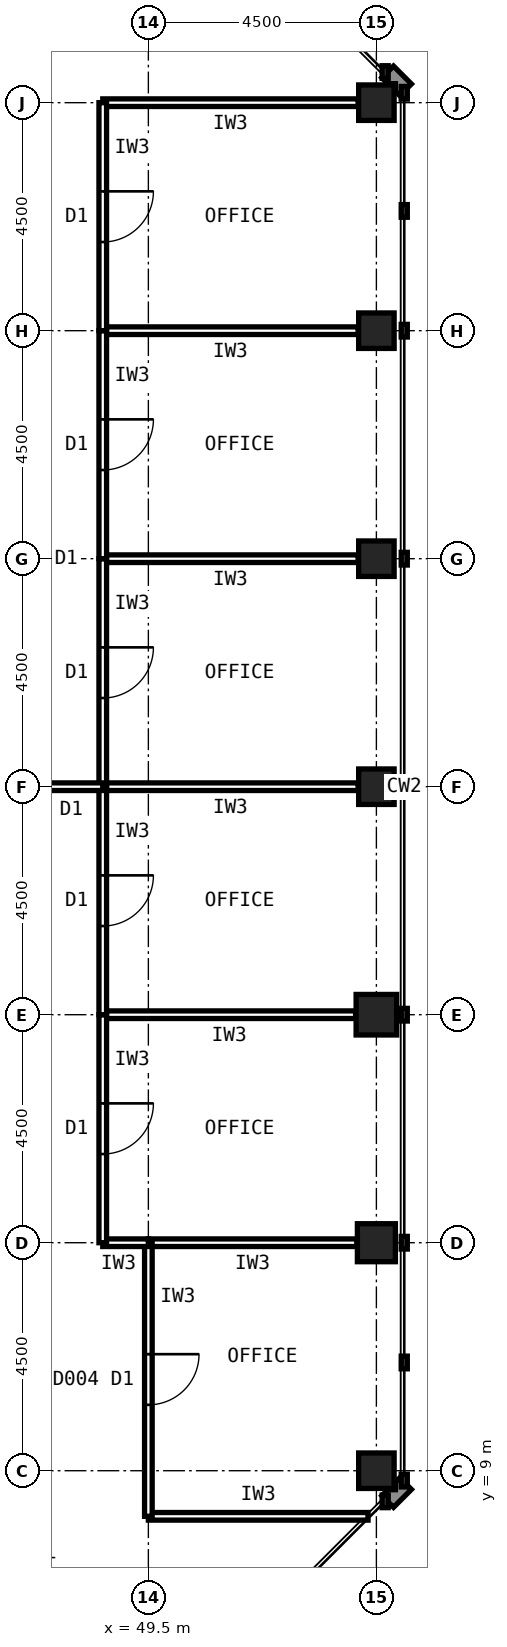
"""IFC4 building model, lengths in metres.
Left out: names, types, materials, properties, quantities, classifications, styles, units other than length and angle.
Written with IfcOpenShell. Run it as: python <this file> out.ifc"""

import sys

from ifc_helpers import new_model, si_unit, direction, frame, frame_2d, origin, origin_2d, place, context, subcontext, project, spatial, rectangle, hollow_rectangle, extrude, element, fill, save


model = new_model("IFC4")
c1 = context("Model", 3, precision=1e-05, world=origin(), true_north=direction((0.0, 1.0)))
c2 = subcontext(c1, "Body", "Model", "MODEL_VIEW")
j1 = project(units=[si_unit("LENGTHUNIT", "METRE"), si_unit("PLANEANGLEUNIT", "RADIAN")], contexts=[c1])
p1 = place(None, origin())
s1 = spatial("IfcSite", under=j1, at=p1, CompositionType="ELEMENT")
p2 = place(p1, origin())
s2 = spatial("IfcBuilding", under=s1, at=p2, CompositionType="ELEMENT")
p3 = place(p2, frame((0.0, 0.0, 175.6)))
s3 = spatial("IfcBuildingStorey", under=s2, at=p3, CompositionType="ELEMENT", Elevation=175.6)
p4 = place(p3, frame((54.0, 9.0, 0.0), z_axis=(0.0, 0.0, 1.0), x_axis=(1.0, 0.0, 0.0)))
e1 = element("IfcColumn", 1, at=p4, inside=s3, PredefinedType="COLUMN", context=c2, shape_type="SweptSolid", body=[
    extrude(hollow_rectangle(XDim=0.7, YDim=0.7, WallThickness=0.036, at=origin_2d()), origin(), (0.0, 0.0, 1.0), 4.0),
])
p5 = place(p3, frame((54.0, 13.5, 0.0), z_axis=(0.0, 0.0, 1.0), x_axis=(1.0, 0.0, 0.0)))
e2 = element("IfcColumn", 2, at=p5, inside=s3, PredefinedType="COLUMN", context=c2, shape_type="SweptSolid", body=[
    extrude(hollow_rectangle(XDim=0.75, YDim=0.75, WallThickness=0.04, at=origin_2d()), origin(), (0.0, 0.0, 1.0), 4.0),
])
p6 = place(p3, frame((54.0, 18.0, 0.0), z_axis=(0.0, 0.0, 1.0), x_axis=(1.0, 0.0, 0.0)))
e3 = element("IfcColumn", 3, at=p6, inside=s3, PredefinedType="COLUMN", context=c2, shape_type="SweptSolid", body=[
    extrude(hollow_rectangle(XDim=0.8, YDim=0.8, WallThickness=0.045, at=origin_2d()), origin(), (0.0, 0.0, 1.0), 4.0),
])
for number, where, z_axis, x_axis in (
    (4, (54.0, 22.5, 0.0), (0.0, 0.0, 1.0), (1.0, 0.0, 0.0)),
    (5, (54.0, 27.0, 0.0), (0.0, 0.0, 1.0), (1.0, 0.0, 0.0)),
    (6, (54.0, 31.5, 0.0), (0.0, 0.0, 1.0), (1.0, 0.0, 0.0)),
    (7, (54.0, 36.0, 0.0), (0.0, 0.0, 1.0), (1.0, 0.0, 0.0)),
):
    element("IfcColumn", number, at=place(p3, frame(where, z_axis=z_axis, x_axis=x_axis)), inside=s3, PredefinedType="COLUMN", context=c2, shape_type="SweptSolid", body=[
        extrude(hollow_rectangle(XDim=0.7, YDim=0.7, WallThickness=0.036, at=origin_2d()), origin(), (0.0, 0.0, 1.0), 4.0),
    ])
p7 = place(p3, frame((49.5, 8.1, 0.0), z_axis=(0.0, 0.0, 1.0), x_axis=(1.0, 0.0, 0.0)))
e8 = element("IfcWall", 8, at=p7, inside=s3, PredefinedType="PARTITIONING", context=c2, shape_type="SweptSolid", body=[
    extrude(rectangle(XDim=4.335, YDim=0.15, at=frame_2d((2.168, 0.0))), origin(), (0.0, 0.0, 1.0), 3.84),
])
p8 = place(p3, frame((53.615, 13.5, 0.0), z_axis=(0.0, 0.0, 1.0), x_axis=(-1.0, 0.0, 0.0)))
e9 = element("IfcWall", 9, at=p8, inside=s3, PredefinedType="PARTITIONING", context=c2, shape_type="SweptSolid", body=[
    extrude(rectangle(XDim=4.115, YDim=0.15, at=frame_2d((2.058, 0.0))), origin(), (0.0, 0.0, 1.0), 2.989),
])
p9 = place(p3, frame((49.5, 13.5, 0.0), z_axis=(0.0, 0.0, 1.0), x_axis=(0.0, -1.0, 0.0)))
e10 = element("IfcWall", 10, at=p9, inside=s3, PredefinedType="PARTITIONING", context=c2, shape_type="SweptSolid", body=[
    extrude(rectangle(XDim=5.4, YDim=0.15, at=frame_2d((2.7, 0.0))), origin(), (0.0, 0.0, 1.0), 3.84),
])
p10 = place(p9, frame((2.2, 0.0, 0.0)))
e11 = element("IfcOpeningElement", 11, at=p10, cuts=e10, PredefinedType="OPENING", context=c2, shape_type="SweptSolid", body=[
    extrude(rectangle(XDim=1.0, YDim=2.1, at=frame_2d((0.5, 1.05))), frame((0.0, 0.085, 0.0), z_axis=(0.0, -1.0, 0.0), x_axis=(1.0, 0.0, 0.0)), (0.0, 0.0, 1.0), 0.17),
])
p11 = place(p3, frame((48.6, 13.5, 0.0), z_axis=(0.0, 0.0, 1.0), x_axis=(1.0, 0.0, 0.0)))
e12 = element("IfcWall", 12, at=p11, inside=s3, PredefinedType="PARTITIONING", context=c2, shape_type="SweptSolid", body=[
    extrude(rectangle(XDim=0.9, YDim=0.15, at=frame_2d((0.45, 0.0))), origin(), (0.0, 0.0, 1.0), 2.989),
])
p12 = place(p3, frame((53.59, 18.0, 0.0), z_axis=(0.0, 0.0, 1.0), x_axis=(-1.0, 0.0, 0.0)))
e13 = element("IfcWall", 13, at=p12, inside=s3, PredefinedType="PARTITIONING", context=c2, shape_type="SweptSolid", body=[
    extrude(rectangle(XDim=4.99, YDim=0.15, at=frame_2d((2.495, 0.0))), origin(), (0.0, 0.0, 1.0), 2.989),
])
p13 = place(p3, frame((48.6, 18.0, 0.0), z_axis=(0.0, 0.0, 1.0), x_axis=(0.0, -1.0, 0.0)))
e14 = element("IfcWall", 14, at=p13, inside=s3, PredefinedType="PARTITIONING", context=c2, shape_type="SweptSolid", body=[
    extrude(rectangle(XDim=4.5, YDim=0.15, at=frame_2d((2.25, 0.0))), origin(), (0.0, 0.0, 1.0), 3.84),
])
p14 = place(p13, frame((1.75, 0.0, 0.0)))
e15 = element("IfcOpeningElement", 15, at=p14, cuts=e14, PredefinedType="OPENING", context=c2, shape_type="SweptSolid", body=[
    extrude(rectangle(XDim=1.0, YDim=2.1, at=frame_2d((0.5, 1.05))), frame((0.0, 0.085, 0.0), z_axis=(0.0, -1.0, 0.0), x_axis=(1.0, 0.0, 0.0)), (0.0, 0.0, 1.0), 0.17),
])
p15 = place(p3, frame((53.64, 22.5, 0.0), z_axis=(0.0, 0.0, 1.0), x_axis=(-1.0, 0.0, 0.0)))
e16 = element("IfcWall", 16, at=p15, inside=s3, PredefinedType="PARTITIONING", context=c2, shape_type="SweptSolid", body=[
    extrude(rectangle(XDim=5.04, YDim=0.15, at=frame_2d((2.52, 0.0))), origin(), (0.0, 0.0, 1.0), 2.989),
])
p16 = place(p3, frame((48.6, 22.5, 0.0), z_axis=(0.0, 0.0, 1.0), x_axis=(0.0, -1.0, 0.0)))
e17 = element("IfcWall", 17, at=p16, inside=s3, PredefinedType="PARTITIONING", context=c2, shape_type="SweptSolid", body=[
    extrude(rectangle(XDim=4.5, YDim=0.15, at=frame_2d((2.25, 0.0))), origin(), (0.0, 0.0, 1.0), 3.84),
])
p17 = place(p16, frame((1.75, 0.0, 0.0)))
e18 = element("IfcOpeningElement", 18, at=p17, cuts=e17, PredefinedType="OPENING", context=c2, shape_type="SweptSolid", body=[
    extrude(rectangle(XDim=1.0, YDim=2.1, at=frame_2d((0.5, 1.05))), frame((0.0, 0.085, 0.0), z_axis=(0.0, -1.0, 0.0), x_axis=(1.0, 0.0, 0.0)), (0.0, 0.0, 1.0), 0.17),
])
p18 = place(p3, frame((53.64, 27.0, 0.0), z_axis=(0.0, 0.0, 1.0), x_axis=(-1.0, 0.0, 0.0)))
e19 = element("IfcWall", 19, at=p18, inside=s3, PredefinedType="PARTITIONING", context=c2, shape_type="SweptSolid", body=[
    extrude(rectangle(XDim=5.04, YDim=0.15, at=frame_2d((2.52, 0.0))), origin(), (0.0, 0.0, 1.0), 2.989),
])
p19 = place(p3, frame((48.6, 27.0, 0.0), z_axis=(0.0, 0.0, 1.0), x_axis=(0.0, -1.0, 0.0)))
e20 = element("IfcWall", 20, at=p19, inside=s3, PredefinedType="PARTITIONING", context=c2, shape_type="SweptSolid", body=[
    extrude(rectangle(XDim=4.5, YDim=0.15, at=frame_2d((2.25, 0.0))), origin(), (0.0, 0.0, 1.0), 3.84),
])
p20 = place(p19, frame((1.75, 0.0, 0.0)))
e21 = element("IfcOpeningElement", 21, at=p20, cuts=e20, PredefinedType="OPENING", context=c2, shape_type="SweptSolid", body=[
    extrude(rectangle(XDim=1.0, YDim=2.1, at=frame_2d((0.5, 1.05))), frame((0.0, 0.085, 0.0), z_axis=(0.0, -1.0, 0.0), x_axis=(1.0, 0.0, 0.0)), (0.0, 0.0, 1.0), 0.17),
])
p21 = place(p3, frame((53.64, 31.5, 0.0), z_axis=(0.0, 0.0, 1.0), x_axis=(-1.0, 0.0, 0.0)))
e22 = element("IfcWall", 22, at=p21, inside=s3, PredefinedType="PARTITIONING", context=c2, shape_type="SweptSolid", body=[
    extrude(rectangle(XDim=5.04, YDim=0.15, at=frame_2d((2.52, 0.0))), origin(), (0.0, 0.0, 1.0), 2.989),
])
p22 = place(p3, frame((48.6, 31.5, 0.0), z_axis=(0.0, 0.0, 1.0), x_axis=(0.0, -1.0, 0.0)))
e23 = element("IfcWall", 23, at=p22, inside=s3, PredefinedType="PARTITIONING", context=c2, shape_type="SweptSolid", body=[
    extrude(rectangle(XDim=4.5, YDim=0.15, at=frame_2d((2.25, 0.0))), origin(), (0.0, 0.0, 1.0), 3.84),
])
p23 = place(p22, frame((1.75, 0.0, 0.0)))
e24 = element("IfcOpeningElement", 24, at=p23, cuts=e23, PredefinedType="OPENING", context=c2, shape_type="SweptSolid", body=[
    extrude(rectangle(XDim=1.0, YDim=2.1, at=frame_2d((0.5, 1.05))), frame((0.0, 0.085, 0.0), z_axis=(0.0, -1.0, 0.0), x_axis=(1.0, 0.0, 0.0)), (0.0, 0.0, 1.0), 0.17),
])
p24 = place(p3, frame((53.64, 36.0, 0.0), z_axis=(0.0, 0.0, 1.0), x_axis=(-1.0, 0.0, 0.0)))
e25 = element("IfcWall", 25, at=p24, inside=s3, PredefinedType="PARTITIONING", context=c2, shape_type="SweptSolid", body=[
    extrude(rectangle(XDim=5.04, YDim=0.15, at=frame_2d((2.52, 0.0))), origin(), (0.0, 0.0, 1.0), 2.989),
])
p25 = place(p3, frame((48.6, 36.0, 0.0), z_axis=(0.0, 0.0, 1.0), x_axis=(0.0, -1.0, 0.0)))
e26 = element("IfcWall", 26, at=p25, inside=s3, PredefinedType="PARTITIONING", context=c2, shape_type="SweptSolid", body=[
    extrude(rectangle(XDim=4.5, YDim=0.15, at=frame_2d((2.25, 0.0))), origin(), (0.0, 0.0, 1.0), 3.84),
])
p26 = place(p25, frame((1.75, 0.0, 0.0)))
e27 = element("IfcOpeningElement", 27, at=p26, cuts=e26, PredefinedType="OPENING", context=c2, shape_type="SweptSolid", body=[
    extrude(rectangle(XDim=1.0, YDim=2.1, at=frame_2d((0.5, 1.05))), frame((0.0, 0.085, 0.0), z_axis=(0.0, -1.0, 0.0), x_axis=(1.0, 0.0, 0.0)), (0.0, 0.0, 1.0), 0.17),
])
p27 = place(p3, frame((45.3, 22.5, 0.0), z_axis=(0.0, 0.0, 1.0), x_axis=(1.0, 0.0, 0.0)))
e28 = element("IfcWall", 28, at=p27, inside=s3, PredefinedType="PARTITIONING", context=c2, shape_type="SweptSolid", body=[
    extrude(rectangle(XDim=3.3, YDim=0.15, at=frame_2d((1.65, 0.0))), origin(), (0.0, 0.0, 1.0), 2.989),
])
p28 = place(p27, frame((1.15, 0.0, 0.0)))
e29 = element("IfcOpeningElement", 29, at=p28, cuts=e28, PredefinedType="OPENING", context=c2, shape_type="SweptSolid", body=[
    extrude(rectangle(XDim=1.0, YDim=2.1, at=frame_2d((0.5, 1.05))), frame((0.0, 0.085, 0.0), z_axis=(0.0, -1.0, 0.0), x_axis=(1.0, 0.0, 0.0)), (0.0, 0.0, 1.0), 0.17),
])
p29 = place(p10, origin())
e30 = element("IfcDoor", 30, at=p29, inside=s3, OperationType="SINGLE_SWING_LEFT", PredefinedType="DOOR", context=c2, shape_type="SweptSolid", body=[
    extrude(rectangle(XDim=1.0, YDim=2.1, at=frame_2d((0.5, 1.05))), frame((0.0, 0.025, 0.0), z_axis=(0.0, -1.0, 0.0), x_axis=(1.0, 0.0, 0.0)), (0.0, 0.0, 1.0), 0.05),
])
fill(e11, e30)
p30 = place(p14, origin())
e31 = element("IfcDoor", 31, at=p30, inside=s3, OperationType="SINGLE_SWING_LEFT", PredefinedType="DOOR", context=c2, shape_type="SweptSolid", body=[
    extrude(rectangle(XDim=1.0, YDim=2.1, at=frame_2d((0.5, 1.05))), frame((0.0, 0.025, 0.0), z_axis=(0.0, -1.0, 0.0), x_axis=(1.0, 0.0, 0.0)), (0.0, 0.0, 1.0), 0.05),
])
fill(e15, e31)
p31 = place(p17, origin())
e32 = element("IfcDoor", 32, at=p31, inside=s3, OperationType="SINGLE_SWING_LEFT", PredefinedType="DOOR", context=c2, shape_type="SweptSolid", body=[
    extrude(rectangle(XDim=1.0, YDim=2.1, at=frame_2d((0.5, 1.05))), frame((0.0, 0.025, 0.0), z_axis=(0.0, -1.0, 0.0), x_axis=(1.0, 0.0, 0.0)), (0.0, 0.0, 1.0), 0.05),
])
fill(e18, e32)
p32 = place(p20, origin())
e33 = element("IfcDoor", 33, at=p32, inside=s3, OperationType="SINGLE_SWING_LEFT", PredefinedType="DOOR", context=c2, shape_type="SweptSolid", body=[
    extrude(rectangle(XDim=1.0, YDim=2.1, at=frame_2d((0.5, 1.05))), frame((0.0, 0.025, 0.0), z_axis=(0.0, -1.0, 0.0), x_axis=(1.0, 0.0, 0.0)), (0.0, 0.0, 1.0), 0.05),
])
fill(e21, e33)
p33 = place(p23, origin())
e34 = element("IfcDoor", 34, at=p33, inside=s3, OperationType="SINGLE_SWING_LEFT", PredefinedType="DOOR", context=c2, shape_type="SweptSolid", body=[
    extrude(rectangle(XDim=1.0, YDim=2.1, at=frame_2d((0.5, 1.05))), frame((0.0, 0.025, 0.0), z_axis=(0.0, -1.0, 0.0), x_axis=(1.0, 0.0, 0.0)), (0.0, 0.0, 1.0), 0.05),
])
fill(e24, e34)
p34 = place(p26, origin())
e35 = element("IfcDoor", 35, at=p34, inside=s3, OperationType="SINGLE_SWING_LEFT", PredefinedType="DOOR", context=c2, shape_type="SweptSolid", body=[
    extrude(rectangle(XDim=1.0, YDim=2.1, at=frame_2d((0.5, 1.05))), frame((0.0, 0.025, 0.0), z_axis=(0.0, -1.0, 0.0), x_axis=(1.0, 0.0, 0.0)), (0.0, 0.0, 1.0), 0.05),
])
fill(e27, e35)
save(model, sys.argv[1])
